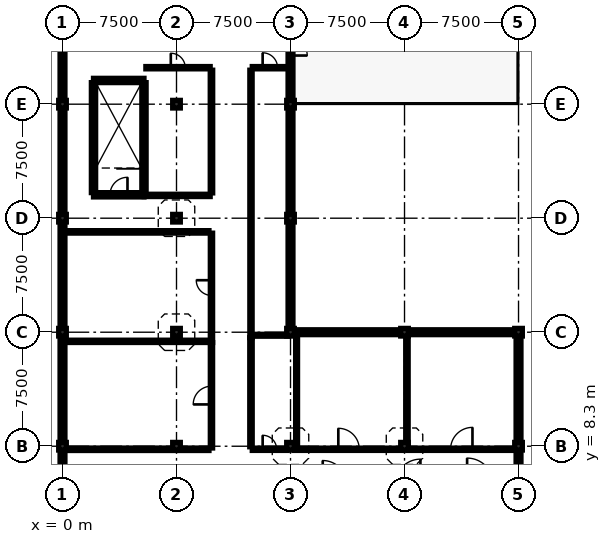
"""IFC4 building model, lengths in metres.
Left out: names, types, materials, properties, quantities, classifications, styles, units other than length and angle.
Written with IfcOpenShell. Run it as: python <this file> out.ifc"""

import sys

from ifc_helpers import new_model, si_unit, direction, frame, frame_2d, origin, origin_2d, place, context, subcontext, project, spatial, rectangle, extrude, element, fill, save


model = new_model("IFC4")
c1 = context("Model", 3, precision=1e-05, world=origin(), true_north=direction((0.0, 1.0)))
c2 = subcontext(c1, "Body", "Model", "MODEL_VIEW")
j1 = project(units=[si_unit("LENGTHUNIT", "METRE"), si_unit("PLANEANGLEUNIT", "RADIAN")], contexts=[c1])
p1 = place(None, origin())
s1 = spatial("IfcSite", under=j1, at=p1, CompositionType="ELEMENT")
p2 = place(p1, origin())
s2 = spatial("IfcBuilding", under=s1, at=p2, CompositionType="ELEMENT")
p3 = place(p2, frame((0.0, 0.0, 21.5)))
s3 = spatial("IfcBuildingStorey", under=s2, at=p3, CompositionType="ELEMENT", Elevation=21.5)
p4 = place(p3, frame((0.0, 8.3, 0.0), z_axis=(0.0, 0.0, 1.0), x_axis=(1.0, 0.0, 0.0)))
e1 = element("IfcColumn", 1, at=p4, inside=s3, PredefinedType="COLUMN", context=c2, shape_type="SweptSolid", body=[
    extrude(rectangle(XDim=0.5, YDim=0.5, at=origin_2d()), origin(), (0.0, 0.0, 1.0), 3.83),
])
for number, where, z_axis, x_axis in (
    (2, (0.0, 15.8, 0.0), (0.0, 0.0, 1.0), (1.0, 0.0, 0.0)),
    (3, (0.0, 23.3, 0.0), (0.0, 0.0, 1.0), (1.0, 0.0, 0.0)),
    (4, (0.0, 30.8, 0.0), (0.0, 0.0, 1.0), (1.0, 0.0, 0.0)),
):
    element("IfcColumn", number, at=place(p3, frame(where, z_axis=z_axis, x_axis=x_axis)), inside=s3, PredefinedType="COLUMN", context=c2, shape_type="SweptSolid", body=[
        extrude(rectangle(XDim=0.5, YDim=0.5, at=origin_2d()), origin(), (0.0, 0.0, 1.0), 3.8),
    ])
p5 = place(p3, frame((7.5, 8.3, 0.0), z_axis=(0.0, 0.0, 1.0), x_axis=(1.0, 0.0, 0.0)))
e5 = element("IfcColumn", 5, at=p5, inside=s3, PredefinedType="COLUMN", context=c2, shape_type="SweptSolid", body=[
    extrude(rectangle(XDim=0.5, YDim=0.5, at=origin_2d()), origin(), (0.0, 0.0, 1.0), 4.08),
])
for number, where, z_axis, x_axis in (
    (6, (7.5, 15.8, 0.0), (0.0, 0.0, 1.0), (1.0, 0.0, 0.0)),
    (7, (7.5, 23.3, 0.0), (0.0, 0.0, 1.0), (1.0, 0.0, 0.0)),
    (8, (7.5, 30.8, 0.0), (0.0, 0.0, 1.0), (1.0, 0.0, 0.0)),
):
    element("IfcColumn", number, at=place(p3, frame(where, z_axis=z_axis, x_axis=x_axis)), inside=s3, PredefinedType="COLUMN", context=c2, shape_type="SweptSolid", body=[
        extrude(rectangle(XDim=0.5, YDim=0.5, at=origin_2d()), origin(), (0.0, 0.0, 1.0), 3.8),
    ])
p6 = place(p3, frame((15.0, 8.3, 0.0), z_axis=(0.0, 0.0, 1.0), x_axis=(1.0, 0.0, 0.0)))
e9 = element("IfcColumn", 9, at=p6, inside=s3, PredefinedType="COLUMN", context=c2, shape_type="SweptSolid", body=[
    extrude(rectangle(XDim=0.5, YDim=0.5, at=origin_2d()), origin(), (0.0, 0.0, 1.0), 4.33),
])
for number, where, z_axis, x_axis in (
    (10, (15.0, 15.8, 0.0), (0.0, 0.0, 1.0), (1.0, 0.0, 0.0)),
    (11, (15.0, 23.3, 0.0), (0.0, 0.0, 1.0), (1.0, 0.0, 0.0)),
    (12, (15.0, 30.8, 0.0), (0.0, 0.0, 1.0), (1.0, 0.0, 0.0)),
):
    element("IfcColumn", number, at=place(p3, frame(where, z_axis=z_axis, x_axis=x_axis)), inside=s3, PredefinedType="COLUMN", context=c2, shape_type="SweptSolid", body=[
        extrude(rectangle(XDim=0.5, YDim=0.5, at=origin_2d()), origin(), (0.0, 0.0, 1.0), 3.8),
    ])
for number, where, z_axis, x_axis in (
    (13, (22.5, 8.3, 0.0), (0.0, 0.0, 1.0), (1.0, 0.0, 0.0)),
    (14, (22.5, 15.8, 0.0), (0.0, 0.0, 1.0), (1.0, 0.0, 0.0)),
):
    element("IfcColumn", number, at=place(p3, frame(where, z_axis=z_axis, x_axis=x_axis)), inside=s3, PredefinedType="COLUMN", context=c2, shape_type="SweptSolid", body=[
        extrude(rectangle(XDim=0.5, YDim=0.5, at=origin_2d()), origin(), (0.0, 0.0, 1.0), 4.58),
    ])
for number, where, z_axis, x_axis in (
    (15, (30.0, 8.3, 0.0), (0.0, 0.0, 1.0), (1.0, 0.0, 0.0)),
    (16, (30.0, 15.8, 0.0), (0.0, 0.0, 1.0), (1.0, 0.0, 0.0)),
):
    element("IfcColumn", number, at=place(p3, frame(where, z_axis=z_axis, x_axis=x_axis)), inside=s3, PredefinedType="COLUMN", context=c2, shape_type="SweptSolid", body=[
        extrude(rectangle(XDim=0.5, YDim=0.5, at=origin_2d()), origin(), (0.0, 0.0, 1.0), 4.83),
    ])
p7 = place(p3, frame((15.0, 38.05, 0.0), z_axis=(0.0, 0.0, 1.0), x_axis=(0.0, -1.0, 0.0)))
e17 = element("IfcWall", 17, at=p7, inside=s3, PredefinedType="SOLIDWALL", context=c2, shape_type="SweptSolid", body=[
    extrude(rectangle(XDim=7.0, YDim=0.32, at=frame_2d((3.5, 0.0))), origin(), (0.0, 0.0, 1.0), 3.7),
])
p8 = place(p7, frame((2.95, 0.0, 0.0)))
e18 = element("IfcOpeningElement", 18, at=p8, cuts=e17, PredefinedType="OPENING", context=c2, shape_type="SweptSolid", body=[
    extrude(rectangle(XDim=1.1, YDim=2.15, at=frame_2d((0.55, 1.075))), frame((0.0, 0.172, 0.0), z_axis=(0.0, -1.0, 0.0), x_axis=(1.0, 0.0, 0.0)), (0.0, 0.0, 1.0), 0.344),
])
p9 = place(p3, frame((15.0, 30.55, 0.0), z_axis=(0.0, 0.0, 1.0), x_axis=(0.0, -1.0, 0.0)))
e19 = element("IfcWall", 19, at=p9, inside=s3, PredefinedType="SOLIDWALL", context=c2, shape_type="SweptSolid", body=[
    extrude(rectangle(XDim=7.0, YDim=0.32, at=frame_2d((3.5, 0.0))), origin(), (0.0, 0.0, 1.0), 3.7),
])
p10 = place(p9, frame((2.8, 0.0, 0.9)))
e20 = element("IfcOpeningElement", 20, at=p10, cuts=e19, PredefinedType="OPENING", context=c2, shape_type="SweptSolid", body=[
    extrude(rectangle(XDim=1.4, YDim=1.9, at=frame_2d((0.7, 0.95))), frame((0.0, 0.172, 0.0), z_axis=(0.0, -1.0, 0.0), x_axis=(1.0, 0.0, 0.0)), (0.0, 0.0, 1.0), 0.344),
])
p11 = place(p3, frame((15.0, 23.05, 0.0), z_axis=(0.0, 0.0, 1.0), x_axis=(0.0, -1.0, 0.0)))
e21 = element("IfcWall", 21, at=p11, inside=s3, PredefinedType="SOLIDWALL", context=c2, shape_type="SweptSolid", body=[
    extrude(rectangle(XDim=7.0, YDim=0.32, at=frame_2d((3.5, 0.0))), origin(), (0.0, 0.0, 1.0), 3.7),
])
p12 = place(p11, frame((2.8, 0.0, 0.9)))
e22 = element("IfcOpeningElement", 22, at=p12, cuts=e21, PredefinedType="OPENING", context=c2, shape_type="SweptSolid", body=[
    extrude(rectangle(XDim=1.4, YDim=1.3, at=frame_2d((0.7, 0.65))), frame((0.0, 0.172, 0.0), z_axis=(0.0, -1.0, 0.0), x_axis=(1.0, 0.0, 0.0)), (0.0, 0.0, 1.0), 0.344),
])
for number, where, z_axis, x_axis in (
    (23, (15.25, 15.8, 0.0), (0.0, 0.0, 1.0), (1.0, 0.0, 0.0)),
    (24, (22.75, 15.8, 0.0), (0.0, 0.0, 1.0), (1.0, 0.0, 0.0)),
):
    element("IfcWall", number, at=place(p3, frame(where, z_axis=z_axis, x_axis=x_axis)), inside=s3, PredefinedType="SOLIDWALL", context=c2, shape_type="SweptSolid", body=[
        extrude(rectangle(XDim=7.0, YDim=0.32, at=frame_2d((3.5, 0.0))), origin(), (0.0, 0.0, 1.0), 3.7),
    ])
p13 = place(p3, frame((30.0, 15.55, 0.0), z_axis=(0.0, 0.0, 1.0), x_axis=(0.0, -1.0, 0.0)))
e25 = element("IfcWall", 25, at=p13, inside=s3, PredefinedType="SOLIDWALL", context=c2, shape_type="SweptSolid", body=[
    extrude(rectangle(XDim=7.0, YDim=0.32, at=frame_2d((3.5, 0.0))), origin(), (0.0, 0.0, 1.0), 3.7),
])
p14 = place(p13, frame((2.8, 0.0, 0.9)))
e26 = element("IfcOpeningElement", 26, at=p14, cuts=e25, PredefinedType="OPENING", context=c2, shape_type="SweptSolid", body=[
    extrude(rectangle(XDim=1.4, YDim=1.5, at=frame_2d((0.7, 0.75))), frame((0.0, 0.172, 0.0), z_axis=(0.0, -1.0, 0.0), x_axis=(1.0, 0.0, 0.0)), (0.0, 0.0, 1.0), 0.344),
])
for number, where, z_axis, x_axis in (
    (27, (30.0, 8.05, 0.0), (0.0, 0.0, 1.0), (0.0, -1.0, 0.0)),
    (28, (0.0, 1.05, 0.0), (0.0, 0.0, 1.0), (0.0, 1.0, 0.0)),
    (29, (0.0, 8.55, 0.0), (0.0, 0.0, 1.0), (0.0, 1.0, 0.0)),
    (30, (0.0, 16.05, 0.0), (0.0, 0.0, 1.0), (0.0, 1.0, 0.0)),
):
    element("IfcWall", number, at=place(p3, frame(where, z_axis=z_axis, x_axis=x_axis)), inside=s3, PredefinedType="SOLIDWALL", context=c2, shape_type="SweptSolid", body=[
        extrude(rectangle(XDim=7.0, YDim=0.32, at=frame_2d((3.5, 0.0))), origin(), (0.0, 0.0, 1.0), 3.7),
    ])
p15 = place(p3, frame((0.0, 23.55, 0.0), z_axis=(0.0, 0.0, 1.0), x_axis=(0.0, 1.0, 0.0)))
e31 = element("IfcWall", 31, at=p15, inside=s3, PredefinedType="SOLIDWALL", context=c2, shape_type="SweptSolid", body=[
    extrude(rectangle(XDim=7.0, YDim=0.32, at=frame_2d((3.5, 0.0))), origin(), (0.0, 0.0, 1.0), 3.7),
])
p16 = place(p15, frame((2.8, 0.0, 0.9)))
e32 = element("IfcOpeningElement", 32, at=p16, cuts=e31, PredefinedType="OPENING", context=c2, shape_type="SweptSolid", body=[
    extrude(rectangle(XDim=1.4, YDim=1.3, at=frame_2d((0.7, 0.65))), frame((0.0, 0.172, 0.0), z_axis=(0.0, -1.0, 0.0), x_axis=(1.0, 0.0, 0.0)), (0.0, 0.0, 1.0), 0.344),
])
p17 = place(p3, frame((0.0, 31.05, 0.0), z_axis=(0.0, 0.0, 1.0), x_axis=(0.0, 1.0, 0.0)))
e33 = element("IfcWall", 33, at=p17, inside=s3, PredefinedType="SOLIDWALL", context=c2, shape_type="SweptSolid", body=[
    extrude(rectangle(XDim=7.0, YDim=0.32, at=frame_2d((3.5, 0.0))), origin(), (0.0, 0.0, 1.0), 3.7),
])
p18 = place(p3, frame((5.36, 24.985, 0.0), z_axis=(0.0, 0.0, 1.0), x_axis=(0.0, 1.0, 0.0)))
e34 = element("IfcWall", 34, at=p18, inside=s3, PredefinedType="SHEAR", context=c2, shape_type="SweptSolid", body=[
    extrude(rectangle(XDim=7.23, YDim=0.28, at=frame_2d((3.615, 0.0))), origin(), (0.0, 0.0, 1.0), 3.72),
])
p19 = place(p3, frame((5.36, 32.36, 0.0), z_axis=(0.0, 0.0, 1.0), x_axis=(-1.0, 0.0, 0.0)))
e35 = element("IfcWall", 35, at=p19, inside=s3, PredefinedType="SHEAR", context=c2, shape_type="SweptSolid", body=[
    extrude(rectangle(XDim=3.32, YDim=0.28, at=frame_2d((1.66, 0.0))), origin(), (0.0, 0.0, 1.0), 3.72),
])
p20 = place(p3, frame((2.04, 32.215, 0.0), z_axis=(0.0, 0.0, 1.0), x_axis=(0.0, -1.0, 0.0)))
e36 = element("IfcWall", 36, at=p20, inside=s3, PredefinedType="SHEAR", context=c2, shape_type="SweptSolid", body=[
    extrude(rectangle(XDim=7.23, YDim=0.28, at=frame_2d((3.615, 0.0))), origin(), (0.0, 0.0, 1.0), 3.72),
])
p21 = place(p3, frame((2.04, 24.84, 0.0), z_axis=(0.0, 0.0, 1.0), x_axis=(1.0, 0.0, 0.0)))
e37 = element("IfcWall", 37, at=p21, inside=s3, PredefinedType="SHEAR", context=c2, shape_type="SweptSolid", body=[
    extrude(rectangle(XDim=3.32, YDim=0.28, at=frame_2d((1.66, 0.0))), origin(), (0.0, 0.0, 1.0), 3.72),
])
p22 = place(p21, frame((1.085, 0.0, 0.0)))
e38 = element("IfcOpeningElement", 38, at=p22, cuts=e37, PredefinedType="OPENING", context=c2, shape_type="SweptSolid", body=[
    extrude(rectangle(XDim=1.15, YDim=2.15, at=frame_2d((0.575, 1.075))), frame((0.0, 0.152, 0.0), z_axis=(0.0, -1.0, 0.0), x_axis=(1.0, 0.0, 0.0)), (0.0, 0.0, 1.0), 0.304),
])
p23 = place(p3, frame((15.262, 8.1, 0.0), z_axis=(0.0, 0.0, 1.0), x_axis=(1.0, 0.0, 0.0)))
e39 = element("IfcWall", 39, at=p23, inside=s3, PredefinedType="PARTITIONING", context=c2, shape_type="SweptSolid", body=[
    extrude(rectangle(XDim=7.146, YDim=0.15, at=frame_2d((3.573, 0.0))), origin(), (0.0, 0.0, 1.0), 3.7),
])
p24 = place(p23, frame((2.883, 0.0, 0.0)))
e40 = element("IfcOpeningElement", 40, at=p24, cuts=e39, PredefinedType="OPENING", context=c2, shape_type="SweptSolid", body=[
    extrude(rectangle(XDim=1.38, YDim=2.3, at=frame_2d((0.69, 1.15))), frame((0.0, 0.087, 0.0), z_axis=(0.0, -1.0, 0.0), x_axis=(1.0, 0.0, 0.0)), (0.0, 0.0, 1.0), 0.174),
])
p25 = place(p3, frame((22.762, 8.1, 0.0), z_axis=(0.0, 0.0, 1.0), x_axis=(1.0, 0.0, 0.0)))
e41 = element("IfcWall", 41, at=p25, inside=s3, PredefinedType="PARTITIONING", context=c2, shape_type="SweptSolid", body=[
    extrude(rectangle(XDim=6.976, YDim=0.15, at=frame_2d((3.488, 0.0))), origin(), (0.0, 0.0, 1.0), 3.7),
])
p26 = place(p25, frame((2.768, 0.0, 0.0)))
e42 = element("IfcOpeningElement", 42, at=p26, cuts=e41, PredefinedType="OPENING", context=c2, shape_type="SweptSolid", body=[
    extrude(rectangle(XDim=1.44, YDim=2.32, at=frame_2d((0.72, 1.16))), frame((0.0, 0.087, 0.0), z_axis=(0.0, -1.0, 0.0), x_axis=(1.0, 0.0, 0.0)), (0.0, 0.0, 1.0), 0.174),
])
p27 = place(p3, frame((9.8, 8.185, 0.0), z_axis=(0.0, 0.0, 1.0), x_axis=(0.0, 1.0, 0.0)))
e43 = element("IfcWall", 43, at=p27, inside=s3, PredefinedType="PARTITIONING", context=c2, shape_type="SweptSolid", body=[
    extrude(rectangle(XDim=6.93, YDim=0.15, at=frame_2d((3.465, 0.0))), origin(), (0.0, 0.0, 1.0), 3.7),
])
p28 = place(p27, frame((2.865, 0.0, 0.0)))
e44 = element("IfcOpeningElement", 44, at=p28, cuts=e43, PredefinedType="OPENING", context=c2, shape_type="SweptSolid", body=[
    extrude(rectangle(XDim=1.2, YDim=2.15, at=frame_2d((0.6, 1.075))), frame((0.0, 0.087, 0.0), z_axis=(0.0, -1.0, 0.0), x_axis=(1.0, 0.0, 0.0)), (0.0, 0.0, 1.0), 0.174),
])
p29 = place(p3, frame((9.8, 15.127, 0.0), z_axis=(0.0, 0.0, 1.0), x_axis=(0.0, 1.0, 0.0)))
e45 = element("IfcWall", 45, at=p29, inside=s3, PredefinedType="PARTITIONING", context=c2, shape_type="SweptSolid", body=[
    extrude(rectangle(XDim=7.188, YDim=0.15, at=frame_2d((3.594, 0.0))), origin(), (0.0, 0.0, 1.0), 3.7),
])
p30 = place(p29, frame((3.094, 0.0, 0.0)))
e46 = element("IfcOpeningElement", 46, at=p30, cuts=e45, PredefinedType="OPENING", context=c2, shape_type="SweptSolid", body=[
    extrude(rectangle(XDim=1.0, YDim=2.22, at=frame_2d((0.5, 1.11))), frame((0.0, 0.087, 0.0), z_axis=(0.0, -1.0, 0.0), x_axis=(1.0, 0.0, 0.0)), (0.0, 0.0, 1.0), 0.174),
])
p31 = place(p3, frame((5.485, 33.2, 0.0), z_axis=(0.0, 0.0, 1.0), x_axis=(1.0, 0.0, 0.0)))
e47 = element("IfcWall", 47, at=p31, inside=s3, PredefinedType="PARTITIONING", context=c2, shape_type="SweptSolid", body=[
    extrude(rectangle(XDim=4.23, YDim=0.15, at=frame_2d((2.115, 0.0))), origin(), (0.0, 0.0, 1.0), 3.7),
])
p32 = place(p31, frame((1.64, 0.0, 0.0)))
e48 = element("IfcOpeningElement", 48, at=p32, cuts=e47, PredefinedType="OPENING", context=c2, shape_type="SweptSolid", body=[
    extrude(rectangle(XDim=0.95, YDim=2.15, at=frame_2d((0.475, 1.075))), frame((0.0, 0.087, 0.0), z_axis=(0.0, -1.0, 0.0), x_axis=(1.0, 0.0, 0.0)), (0.0, 0.0, 1.0), 0.174),
])
p33 = place(p3, frame((12.485, 8.1, 0.0), z_axis=(0.0, 0.0, 1.0), x_axis=(1.0, 0.0, 0.0)))
e49 = element("IfcWall", 49, at=p33, inside=s3, PredefinedType="PARTITIONING", context=c2, shape_type="SweptSolid", body=[
    extrude(rectangle(XDim=2.285, YDim=0.15, at=frame_2d((1.143, 0.0))), origin(), (0.0, 0.0, 1.0), 3.7),
])
p34 = place(p33, frame((0.683, 0.0, 0.0)))
e50 = element("IfcOpeningElement", 50, at=p34, cuts=e49, PredefinedType="OPENING", context=c2, shape_type="SweptSolid", body=[
    extrude(rectangle(XDim=0.92, YDim=2.1, at=frame_2d((0.46, 1.05))), frame((0.0, 0.087, 0.0), z_axis=(0.0, -1.0, 0.0), x_axis=(1.0, 0.0, 0.0)), (0.0, 0.0, 1.0), 0.174),
])
p35 = place(p3, frame((12.485, 33.2, 0.0), z_axis=(0.0, 0.0, 1.0), x_axis=(1.0, 0.0, 0.0)))
e51 = element("IfcWall", 51, at=p35, inside=s3, PredefinedType="PARTITIONING", context=c2, shape_type="SweptSolid", body=[
    extrude(rectangle(XDim=2.343, YDim=0.15, at=frame_2d((1.171, 0.0))), origin(), (0.0, 0.0, 1.0), 3.7),
])
p36 = place(p35, frame((0.681, 0.0, 0.0)))
e52 = element("IfcOpeningElement", 52, at=p36, cuts=e51, PredefinedType="OPENING", context=c2, shape_type="SweptSolid", body=[
    extrude(rectangle(XDim=0.98, YDim=2.12, at=frame_2d((0.49, 1.06))), frame((0.0, 0.087, 0.0), z_axis=(0.0, -1.0, 0.0), x_axis=(1.0, 0.0, 0.0)), (0.0, 0.0, 1.0), 0.174),
])
p37 = place(p3, frame((5.372, 24.8, 0.0), z_axis=(0.0, 0.0, 1.0), x_axis=(1.0, 0.0, 0.0)))
e53 = element("IfcWall", 53, at=p37, inside=s3, PredefinedType="PARTITIONING", context=c2, shape_type="SweptSolid", body=[
    extrude(rectangle(XDim=4.343, YDim=0.15, at=frame_2d((2.171, 0.0))), origin(), (0.0, 0.0, 1.0), 3.7),
])
p38 = place(p3, frame((12.485, 15.6, 0.0), z_axis=(0.0, 0.0, 1.0), x_axis=(1.0, 0.0, 0.0)))
e54 = element("IfcWall", 54, at=p38, inside=s3, PredefinedType="PARTITIONING", context=c2, shape_type="SweptSolid", body=[
    extrude(rectangle(XDim=2.38, YDim=0.125, at=frame_2d((1.19, 0.0))), origin(), (0.0, 0.0, 1.0), 3.7),
])
p39 = place(p3, frame((15.4, 8.187, 0.0), z_axis=(0.0, 0.0, 1.0), x_axis=(0.0, 1.0, 0.0)))
e55 = element("IfcWall", 55, at=p39, inside=s3, PredefinedType="PARTITIONING", context=c2, shape_type="SweptSolid", body=[
    extrude(rectangle(XDim=7.441, YDim=0.125, at=frame_2d((3.72, 0.0))), origin(), (0.0, 0.0, 1.0), 3.7),
])
p40 = place(p3, frame((22.66, 8.432, 0.0), z_axis=(0.0, 0.0, 1.0), x_axis=(0.0, 1.0, 0.0)))
e56 = element("IfcWall", 56, at=p40, inside=s3, PredefinedType="PARTITIONING", context=c2, shape_type="SweptSolid", body=[
    extrude(rectangle(XDim=7.106, YDim=0.16, at=frame_2d((3.553, 0.0))), origin(), (0.0, 0.0, 1.0), 3.7),
])
p41 = place(p3, frame((0.262, 8.1, 0.0), z_axis=(0.0, 0.0, 1.0), x_axis=(1.0, 0.0, 0.0)))
e57 = element("IfcWall", 57, at=p41, inside=s3, PredefinedType="PARTITIONING", context=c2, shape_type="SweptSolid", body=[
    extrude(rectangle(XDim=9.373, YDim=0.16, at=frame_2d((4.687, 0.0))), origin(), (0.0, 0.0, 1.0), 3.7),
])
p42 = place(p3, frame((0.172, 15.2, 0.0), z_axis=(0.0, 0.0, 1.0), x_axis=(1.0, 0.0, 0.0)))
e58 = element("IfcWall", 58, at=p42, inside=s3, PredefinedType="PARTITIONING", context=c2, shape_type="SweptSolid", body=[
    extrude(rectangle(XDim=9.541, YDim=0.15, at=frame_2d((4.771, 0.0))), origin(), (0.0, 0.0, 1.0), 3.7),
])
p43 = place(p3, frame((0.172, 22.4, 0.0), z_axis=(0.0, 0.0, 1.0), x_axis=(1.0, 0.0, 0.0)))
e59 = element("IfcWall", 59, at=p43, inside=s3, PredefinedType="PARTITIONING", context=c2, shape_type="SweptSolid", body=[
    extrude(rectangle(XDim=9.463, YDim=0.16, at=frame_2d((4.731, 0.0))), origin(), (0.0, 0.0, 1.0), 3.7),
])
p44 = place(p3, frame((9.8, 24.965, 0.0), z_axis=(0.0, 0.0, 1.0), x_axis=(0.0, 1.0, 0.0)))
e60 = element("IfcWall", 60, at=p44, inside=s3, PredefinedType="PARTITIONING", context=c2, shape_type="SweptSolid", body=[
    extrude(rectangle(XDim=8.07, YDim=0.16, at=frame_2d((4.035, 0.0))), origin(), (0.0, 0.0, 1.0), 3.7),
])
p45 = place(p3, frame((12.4, 8.265, 0.0), z_axis=(0.0, 0.0, 1.0), x_axis=(0.0, 1.0, 0.0)))
e61 = element("IfcWall", 61, at=p45, inside=s3, PredefinedType="PARTITIONING", context=c2, shape_type="SweptSolid", body=[
    extrude(rectangle(XDim=7.17, YDim=0.16, at=frame_2d((3.585, 0.0))), origin(), (0.0, 0.0, 1.0), 3.7),
])
p46 = place(p3, frame((12.4, 15.447, 0.0), z_axis=(0.0, 0.0, 1.0), x_axis=(0.0, 1.0, 0.0)))
e62 = element("IfcWall", 62, at=p46, inside=s3, PredefinedType="PARTITIONING", context=c2, shape_type="SweptSolid", body=[
    extrude(rectangle(XDim=17.588, YDim=0.15, at=frame_2d((8.794, 0.0))), origin(), (0.0, 0.0, 1.0), 3.7),
])
p47 = place(p8, origin())
e63 = element("IfcDoor", 63, at=p47, inside=s3, OperationType="SINGLE_SWING_RIGHT", PredefinedType="DOOR", context=c2, shape_type="SweptSolid", body=[
    extrude(rectangle(XDim=1.1, YDim=2.15, at=frame_2d((0.55, 1.075))), frame((0.0, 0.025, 0.0), z_axis=(0.0, -1.0, 0.0), x_axis=(1.0, 0.0, 0.0)), (0.0, 0.0, 1.0), 0.05),
])
fill(e18, e63)
p48 = place(p10, origin())
e64 = element("IfcWindow", 64, at=p48, inside=s3, PartitioningType="SINGLE_PANEL", PredefinedType="WINDOW", context=c2, shape_type="SweptSolid", body=[
    extrude(rectangle(XDim=1.4, YDim=1.9, at=frame_2d((0.7, 0.95))), frame((0.0, 0.03, 0.0), z_axis=(0.0, -1.0, 0.0), x_axis=(1.0, 0.0, 0.0)), (0.0, 0.0, 1.0), 0.06),
])
fill(e20, e64)
p49 = place(p12, origin())
e65 = element("IfcWindow", 65, at=p49, inside=s3, PartitioningType="SINGLE_PANEL", PredefinedType="WINDOW", context=c2, shape_type="SweptSolid", body=[
    extrude(rectangle(XDim=1.4, YDim=1.3, at=frame_2d((0.7, 0.65))), frame((0.0, 0.03, 0.0), z_axis=(0.0, -1.0, 0.0), x_axis=(1.0, 0.0, 0.0)), (0.0, 0.0, 1.0), 0.06),
])
fill(e22, e65)
p50 = place(p14, origin())
e66 = element("IfcWindow", 66, at=p50, inside=s3, PartitioningType="SINGLE_PANEL", PredefinedType="WINDOW", context=c2, shape_type="SweptSolid", body=[
    extrude(rectangle(XDim=1.4, YDim=1.5, at=frame_2d((0.7, 0.75))), frame((0.0, 0.03, 0.0), z_axis=(0.0, -1.0, 0.0), x_axis=(1.0, 0.0, 0.0)), (0.0, 0.0, 1.0), 0.06),
])
fill(e26, e66)
p51 = place(p16, origin())
e67 = element("IfcWindow", 67, at=p51, inside=s3, PartitioningType="SINGLE_PANEL", PredefinedType="WINDOW", context=c2, shape_type="SweptSolid", body=[
    extrude(rectangle(XDim=1.4, YDim=1.3, at=frame_2d((0.7, 0.65))), frame((0.0, 0.03, 0.0), z_axis=(0.0, -1.0, 0.0), x_axis=(1.0, 0.0, 0.0)), (0.0, 0.0, 1.0), 0.06),
])
fill(e32, e67)
p52 = place(p22, origin())
e68 = element("IfcDoor", 68, at=p52, inside=s3, OperationType="SINGLE_SWING_RIGHT", PredefinedType="DOOR", context=c2, shape_type="SweptSolid", body=[
    extrude(rectangle(XDim=1.15, YDim=2.15, at=frame_2d((0.575, 1.075))), frame((0.0, 0.025, 0.0), z_axis=(0.0, -1.0, 0.0), x_axis=(1.0, 0.0, 0.0)), (0.0, 0.0, 1.0), 0.05),
])
fill(e38, e68)
p53 = place(p24, origin())
e69 = element("IfcDoor", 69, at=p53, inside=s3, OperationType="SINGLE_SWING_LEFT", PredefinedType="DOOR", context=c2, shape_type="SweptSolid", body=[
    extrude(rectangle(XDim=1.38, YDim=2.3, at=frame_2d((0.69, 1.15))), frame((0.0, 0.025, 0.0), z_axis=(0.0, -1.0, 0.0), x_axis=(1.0, 0.0, 0.0)), (0.0, 0.0, 1.0), 0.05),
])
fill(e40, e69)
p54 = place(p26, origin())
e70 = element("IfcDoor", 70, at=p54, inside=s3, OperationType="SINGLE_SWING_RIGHT", PredefinedType="DOOR", context=c2, shape_type="SweptSolid", body=[
    extrude(rectangle(XDim=1.44, YDim=2.32, at=frame_2d((0.72, 1.16))), frame((0.0, 0.025, 0.0), z_axis=(0.0, -1.0, 0.0), x_axis=(1.0, 0.0, 0.0)), (0.0, 0.0, 1.0), 0.05),
])
fill(e42, e70)
p55 = place(p28, origin())
e71 = element("IfcDoor", 71, at=p55, inside=s3, OperationType="SINGLE_SWING_LEFT", PredefinedType="DOOR", context=c2, shape_type="SweptSolid", body=[
    extrude(rectangle(XDim=1.2, YDim=2.15, at=frame_2d((0.6, 1.075))), frame((0.0, 0.025, 0.0), z_axis=(0.0, -1.0, 0.0), x_axis=(1.0, 0.0, 0.0)), (0.0, 0.0, 1.0), 0.05),
])
fill(e44, e71)
p56 = place(p30, origin())
e72 = element("IfcDoor", 72, at=p56, inside=s3, OperationType="SINGLE_SWING_RIGHT", PredefinedType="DOOR", context=c2, shape_type="SweptSolid", body=[
    extrude(rectangle(XDim=1.0, YDim=2.22, at=frame_2d((0.5, 1.11))), frame((0.0, 0.025, 0.0), z_axis=(0.0, -1.0, 0.0), x_axis=(1.0, 0.0, 0.0)), (0.0, 0.0, 1.0), 0.05),
])
fill(e46, e72)
p57 = place(p32, origin())
e73 = element("IfcDoor", 73, at=p57, inside=s3, OperationType="SINGLE_SWING_LEFT", PredefinedType="DOOR", context=c2, shape_type="SweptSolid", body=[
    extrude(rectangle(XDim=0.95, YDim=2.15, at=frame_2d((0.475, 1.075))), frame((0.0, 0.025, 0.0), z_axis=(0.0, -1.0, 0.0), x_axis=(1.0, 0.0, 0.0)), (0.0, 0.0, 1.0), 0.05),
])
fill(e48, e73)
p58 = place(p34, origin())
e74 = element("IfcDoor", 74, at=p58, inside=s3, OperationType="SINGLE_SWING_LEFT", PredefinedType="DOOR", context=c2, shape_type="SweptSolid", body=[
    extrude(rectangle(XDim=0.92, YDim=2.1, at=frame_2d((0.46, 1.05))), frame((0.0, 0.025, 0.0), z_axis=(0.0, -1.0, 0.0), x_axis=(1.0, 0.0, 0.0)), (0.0, 0.0, 1.0), 0.05),
])
fill(e50, e74)
p59 = place(p36, origin())
e75 = element("IfcDoor", 75, at=p59, inside=s3, OperationType="SINGLE_SWING_LEFT", PredefinedType="DOOR", context=c2, shape_type="SweptSolid", body=[
    extrude(rectangle(XDim=0.98, YDim=2.12, at=frame_2d((0.49, 1.06))), frame((0.0, 0.025, 0.0), z_axis=(0.0, -1.0, 0.0), x_axis=(1.0, 0.0, 0.0)), (0.0, 0.0, 1.0), 0.05),
])
fill(e52, e75)
save(model, sys.argv[1])
